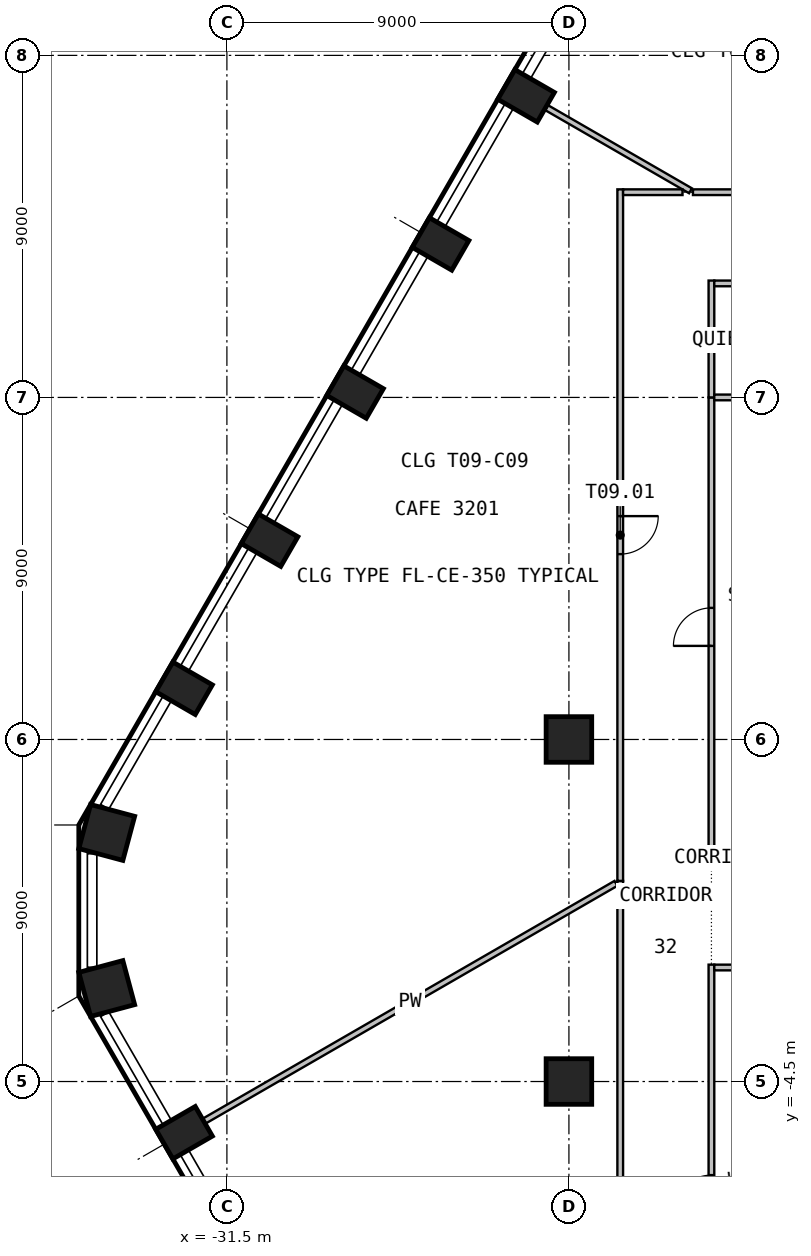
"""IFC4 building model, lengths in metres.
Left out: names, types, materials, properties, quantities, classifications, styles, units other than length and angle.
Written with IfcOpenShell. Run it as: python <this file> out.ifc"""

import sys

from ifc_helpers import new_model, si_unit, direction, frame, frame_2d, origin, origin_2d, place, context, subcontext, project, spatial, rectangle, circle, extrude, element, fill, save


model = new_model("IFC4")
c1 = context("Model", 3, precision=1e-05, world=origin(), true_north=direction((0.0, 1.0)))
c2 = subcontext(c1, "Body", "Model", "MODEL_VIEW")
j1 = project(units=[si_unit("LENGTHUNIT", "METRE"), si_unit("PLANEANGLEUNIT", "RADIAN")], contexts=[c1])
p1 = place(None, origin())
s1 = spatial("IfcSite", under=j1, at=p1, CompositionType="ELEMENT")
p2 = place(p1, origin())
s2 = spatial("IfcBuilding", under=s1, at=p2, CompositionType="ELEMENT")
p3 = place(p2, frame((0.0, 0.0, 132.6)))
s3 = spatial("IfcBuildingStorey", under=s2, at=p3, CompositionType="ELEMENT", Elevation=132.6)
for number, where, z_axis, x_axis in (
    (1, (-23.627, 21.436, 0.0), (0.0, 0.0, 1.0), (-0.5, -0.866, 0.0)),
    (2, (-25.877, 17.539, 0.0), (0.0, 0.0, 1.0), (-0.5, -0.866, 0.0)),
    (3, (-28.127, 13.641, 0.0), (0.0, 0.0, 1.0), (-0.5, -0.866, 0.0)),
    (4, (-30.377, 9.744, 0.0), (0.0, 0.0, 1.0), (-0.5, -0.866, 0.0)),
    (5, (-32.627, 5.847, 0.0), (0.0, 0.0, 1.0), (-0.5, -0.866, 0.0)),
):
    element("IfcColumn", number, at=place(p3, frame(where, z_axis=z_axis, x_axis=x_axis)), inside=s3, PredefinedType="COLUMN", context=c2, shape_type="SweptSolid", body=[
        extrude(rectangle(XDim=0.9, YDim=1.2, at=origin_2d()), origin(), (0.0, 0.0, 1.0), 3.575),
    ])
for number, where, z_axis, x_axis in (
    (6, (-34.662, 2.053, 0.0), (0.0, 0.0, 1.0), (-0.259, -0.966, 0.0)),
    (7, (-34.662, -2.053, 0.0), (0.0, 0.0, 1.0), (0.259, -0.966, 0.0)),
):
    element("IfcColumn", number, at=place(p3, frame(where, z_axis=z_axis, x_axis=x_axis)), inside=s3, PredefinedType="COLUMN", context=c2, shape_type="SweptSolid", body=[
        extrude(rectangle(XDim=1.2, YDim=1.2, at=origin_2d()), origin(), (0.0, 0.0, 1.0), 3.575),
    ])
p4 = place(p3, frame((-32.627, -5.847, 0.0), z_axis=(0.0, 0.0, 1.0), x_axis=(0.5, -0.866025403784, 0.0)))
e8 = element("IfcColumn", 8, at=p4, inside=s3, PredefinedType="COLUMN", context=c2, shape_type="SweptSolid", body=[
    extrude(rectangle(XDim=0.9, YDim=1.2, at=origin_2d()), origin(), (0.0, 0.0, 1.0), 3.575),
])
for number, where, z_axis, x_axis in (
    (9, (-22.5, -4.5, 0.0), (0.0, 0.0, 1.0), (1.0, 0.0, 0.0)),
    (10, (-22.5, 4.5, 0.0), (0.0, 0.0, 1.0), (1.0, 0.0, 0.0)),
):
    element("IfcColumn", number, at=place(p3, frame(where, z_axis=z_axis, x_axis=x_axis)), inside=s3, PredefinedType="COLUMN", context=c2, shape_type="SweptSolid", body=[
        extrude(circle(Radius=0.6, at=origin_2d()), origin(), (0.0, 0.0, 1.0), 3.575),
    ])
p5 = place(p3, frame((-21.263, 0.714, 0.0), z_axis=(0.0, 0.0, 1.0), x_axis=(-0.866034381457, -0.499984449893, 0.0)))
e11 = element("IfcWall", 11, at=p5, inside=s3, PredefinedType="PARTITIONING", context=c2, shape_type="SweptSolid", body=[
    extrude(rectangle(XDim=12.503, YDim=0.15, at=frame_2d((6.251, 0.0))), origin(), (0.0, 0.0, 1.0), 3.575),
])
p6 = place(p3, frame((-23.09, 21.126, 0.0), z_axis=(0.0, 0.0, 1.0), x_axis=(0.865968165673, -0.500099126214, 0.0)))
e12 = element("IfcWall", 12, at=p6, inside=s3, PredefinedType="PARTITIONING", context=c2, shape_type="SweptSolid", body=[
    extrude(rectangle(XDim=4.376, YDim=0.15, at=frame_2d((2.188, 0.0))), origin(), (0.0, 0.0, 1.0), 3.575),
])
p7 = place(p3, frame((-21.15, 0.779, 0.0), z_axis=(0.0, 0.0, 1.0), x_axis=(0.0, -1.0, 0.0)))
e13 = element("IfcWall", 13, at=p7, inside=s3, PredefinedType="PARTITIONING", context=c2, shape_type="SweptSolid", body=[
    extrude(rectangle(XDim=19.754, YDim=0.15, at=frame_2d((9.877, 0.0))), origin(), (0.0, 0.0, 1.0), 3.575),
])
p8 = place(p7, frame((9.377, 0.0, 0.0)))
e14 = element("IfcOpeningElement", 14, at=p8, cuts=e13, PredefinedType="OPENING", context=c2, shape_type="SweptSolid", body=[
    extrude(rectangle(XDim=1.0, YDim=2.1, at=frame_2d((0.5, 1.05))), frame((0.0, 0.085, 0.0), z_axis=(0.0, -1.0, 0.0), x_axis=(1.0, 0.0, 0.0)), (0.0, 0.0, 1.0), 0.17),
])
p9 = place(p3, frame((-21.15, 18.975, 0.0), z_axis=(0.0, 0.0, 1.0), x_axis=(0.0, -1.0, 0.0)))
e15 = element("IfcWall", 15, at=p9, inside=s3, PredefinedType="PARTITIONING", context=c2, shape_type="SweptSolid", body=[
    extrude(rectangle(XDim=18.196, YDim=0.15, at=frame_2d((9.098, 0.0))), origin(), (0.0, 0.0, 1.0), 3.575),
])
p10 = place(p9, frame((8.598, 0.0, 0.0)))
e16 = element("IfcOpeningElement", 16, at=p10, cuts=e15, PredefinedType="OPENING", context=c2, shape_type="SweptSolid", body=[
    extrude(rectangle(XDim=1.0, YDim=2.1, at=frame_2d((0.5, 1.05))), frame((0.0, 0.085, 0.0), z_axis=(0.0, -1.0, 0.0), x_axis=(1.0, 0.0, 0.0)), (0.0, 0.0, 1.0), 0.17),
])
p11 = place(p3, frame((-19.511, 18.9, 0.0), z_axis=(0.0, 0.0, 1.0), x_axis=(-1.0, 0.0, 0.0)))
e17 = element("IfcWall", 17, at=p11, inside=s3, PredefinedType="PARTITIONING", context=c2, shape_type="SweptSolid", body=[
    extrude(rectangle(XDim=1.564, YDim=0.15, at=frame_2d((0.782, 0.0))), origin(), (0.0, 0.0, 1.0), 3.575),
])
p12 = place(p3, frame((-13.5, 18.9, 0.0), z_axis=(0.0, 0.0, 1.0), x_axis=(-1.0, 0.0, 0.0)))
e18 = element("IfcWall", 18, at=p12, inside=s3, PredefinedType="PARTITIONING", context=c2, shape_type="SweptSolid", body=[
    extrude(rectangle(XDim=5.736, YDim=0.15, at=frame_2d((2.868, 0.0))), origin(), (0.0, 0.0, 1.0), 3.575),
])
p13 = place(p12, frame((2.368, 0.0, 0.0)))
e19 = element("IfcOpeningElement", 19, at=p13, cuts=e18, PredefinedType="OPENING", context=c2, shape_type="SweptSolid", body=[
    extrude(rectangle(XDim=1.0, YDim=2.1, at=frame_2d((0.5, 1.05))), frame((0.0, 0.085, 0.0), z_axis=(0.0, -1.0, 0.0), x_axis=(1.0, 0.0, 0.0)), (0.0, 0.0, 1.0), 0.17),
])
p14 = place(p3, frame((-18.75, -13.5, 0.0), z_axis=(0.0, 0.0, 1.0), x_axis=(0.0, 1.0, 0.0)))
e20 = element("IfcWall", 20, at=p14, inside=s3, PredefinedType="PARTITIONING", context=c2, shape_type="SweptSolid", body=[
    extrude(rectangle(XDim=12.075, YDim=0.15, at=frame_2d((6.038, 0.0))), origin(), (0.0, 0.0, 1.0), 3.575),
])
p15 = place(p14, frame((5.538, 0.0, 0.0)))
e21 = element("IfcOpeningElement", 21, at=p15, cuts=e20, PredefinedType="OPENING", context=c2, shape_type="SweptSolid", body=[
    extrude(rectangle(XDim=1.0, YDim=2.1, at=frame_2d((0.5, 1.05))), frame((0.0, 0.085, 0.0), z_axis=(0.0, -1.0, 0.0), x_axis=(1.0, 0.0, 0.0)), (0.0, 0.0, 1.0), 0.17),
])
p16 = place(p3, frame((-18.675, -1.5, 0.0), z_axis=(0.0, 0.0, 1.0), x_axis=(1.0, 0.0, 0.0)))
e22 = element("IfcWall", 22, at=p16, inside=s3, PredefinedType="PARTITIONING", context=c2, shape_type="SweptSolid", body=[
    extrude(rectangle(XDim=2.925, YDim=0.15, at=frame_2d((1.462, 0.0))), origin(), (0.0, 0.0, 1.0), 3.575),
])
p17 = place(p3, frame((-18.75, 1.425, 0.0), z_axis=(0.0, 0.0, 1.0), x_axis=(0.0, 1.0, 0.0)))
e23 = element("IfcWall", 23, at=p17, inside=s3, PredefinedType="PARTITIONING", context=c2, shape_type="SweptSolid", body=[
    extrude(rectangle(XDim=12.075, YDim=0.15, at=frame_2d((6.038, 0.0))), origin(), (0.0, 0.0, 1.0), 3.575),
])
p18 = place(p17, frame((5.538, 0.0, 0.0)))
e24 = element("IfcOpeningElement", 24, at=p18, cuts=e23, PredefinedType="OPENING", context=c2, shape_type="SweptSolid", body=[
    extrude(rectangle(XDim=1.0, YDim=2.1, at=frame_2d((0.5, 1.05))), frame((0.0, 0.085, 0.0), z_axis=(0.0, -1.0, 0.0), x_axis=(1.0, 0.0, 0.0)), (0.0, 0.0, 1.0), 0.17),
])
p19 = place(p3, frame((-15.75, 1.5, 0.0), z_axis=(0.0, 0.0, 1.0), x_axis=(-1.0, 0.0, 0.0)))
e25 = element("IfcWall", 25, at=p19, inside=s3, PredefinedType="PARTITIONING", context=c2, shape_type="SweptSolid", body=[
    extrude(rectangle(XDim=2.925, YDim=0.15, at=frame_2d((1.462, 0.0))), origin(), (0.0, 0.0, 1.0), 3.575),
])
p20 = place(p3, frame((-18.75, 13.5, 0.0), z_axis=(0.0, 0.0, 1.0), x_axis=(0.0, 1.0, 0.0)))
e26 = element("IfcWall", 26, at=p20, inside=s3, PredefinedType="PARTITIONING", context=c2, shape_type="SweptSolid", body=[
    extrude(rectangle(XDim=3.075, YDim=0.15, at=frame_2d((1.538, 0.0))), origin(), (0.0, 0.0, 1.0), 3.575),
])
p21 = place(p3, frame((-18.675, 13.5, 0.0), z_axis=(0.0, 0.0, 1.0), x_axis=(1.0, 0.0, 0.0)))
e27 = element("IfcWall", 27, at=p21, inside=s3, PredefinedType="PARTITIONING", context=c2, shape_type="SweptSolid", body=[
    extrude(rectangle(XDim=2.925, YDim=0.15, at=frame_2d((1.462, 0.0))), origin(), (0.0, 0.0, 1.0), 3.575),
])
p22 = place(p3, frame((-18.675, 16.5, 0.0), z_axis=(0.0, 0.0, 1.0), x_axis=(1.0, 0.0, 0.0)))
e28 = element("IfcWall", 28, at=p22, inside=s3, PredefinedType="PARTITIONING", context=c2, shape_type="SweptSolid", body=[
    extrude(rectangle(XDim=5.4, YDim=0.15, at=frame_2d((2.7, 0.0))), origin(), (0.0, 0.0, 1.0), 3.575),
])
p23 = place(p22, frame((2.2, 0.0, 0.0)))
e29 = element("IfcOpeningElement", 29, at=p23, cuts=e28, PredefinedType="OPENING", context=c2, shape_type="SweptSolid", body=[
    extrude(rectangle(XDim=1.0, YDim=2.1, at=frame_2d((0.5, 1.05))), frame((0.0, 0.085, 0.0), z_axis=(0.0, -1.0, 0.0), x_axis=(1.0, 0.0, 0.0)), (0.0, 0.0, 1.0), 0.17),
])
p24 = place(p10, origin())
e30 = element("IfcDoor", 30, at=p24, inside=s3, OperationType="SINGLE_SWING_LEFT", PredefinedType="DOOR", context=c2, shape_type="SweptSolid", body=[
    extrude(rectangle(XDim=1.0, YDim=2.1, at=frame_2d((0.5, 1.05))), frame((0.0, 0.025, 0.0), z_axis=(0.0, -1.0, 0.0), x_axis=(1.0, 0.0, 0.0)), (0.0, 0.0, 1.0), 0.05),
])
fill(e16, e30)
p25 = place(p15, origin())
e31 = element("IfcDoor", 31, at=p25, inside=s3, OperationType="SINGLE_SWING_RIGHT", PredefinedType="DOOR", context=c2, shape_type="SweptSolid", body=[
    extrude(rectangle(XDim=1.0, YDim=2.1, at=frame_2d((0.5, 1.05))), frame((0.0, 0.025, 0.0), z_axis=(0.0, -1.0, 0.0), x_axis=(1.0, 0.0, 0.0)), (0.0, 0.0, 1.0), 0.05),
])
fill(e21, e31)
p26 = place(p18, origin())
e32 = element("IfcDoor", 32, at=p26, inside=s3, OperationType="SINGLE_SWING_LEFT", PredefinedType="DOOR", context=c2, shape_type="SweptSolid", body=[
    extrude(rectangle(XDim=1.0, YDim=2.1, at=frame_2d((0.5, 1.05))), frame((0.0, 0.025, 0.0), z_axis=(0.0, -1.0, 0.0), x_axis=(1.0, 0.0, 0.0)), (0.0, 0.0, 1.0), 0.05),
])
fill(e24, e32)
save(model, sys.argv[1])
